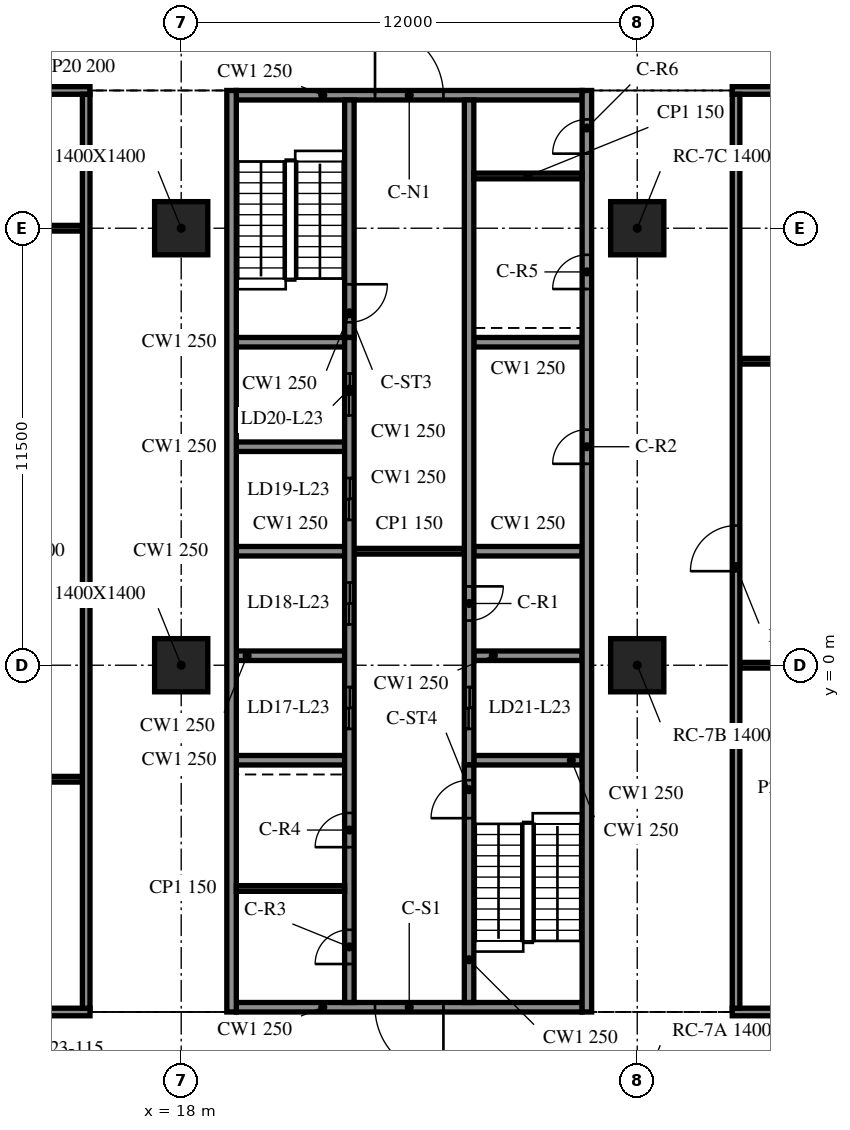
"""IFC4 building model, lengths in metres.
Left out: names, types, materials, properties, quantities, classifications, styles, units other than length and angle.
Written with IfcOpenShell. Run it as: python <this file> out.ifc"""

import sys

from ifc_helpers import new_model, si_unit, direction, frame, frame_2d, origin, origin_2d, place, context, subcontext, project, spatial, rectangle, extrude, element, fill, save


model = new_model("IFC4")
c1 = context("Model", 3, precision=1e-05, world=origin(), true_north=direction((0.0, 1.0)))
c2 = subcontext(c1, "Body", "Model", "MODEL_VIEW")
j1 = project(units=[si_unit("LENGTHUNIT", "METRE"), si_unit("PLANEANGLEUNIT", "RADIAN")], contexts=[c1])
p1 = place(None, origin())
s1 = spatial("IfcSite", under=j1, at=p1, CompositionType="ELEMENT")
p2 = place(p1, origin())
s2 = spatial("IfcBuilding", under=s1, at=p2, CompositionType="ELEMENT")
p3 = place(p2, frame((0.0, 0.0, 101.2)))
s3 = spatial("IfcBuildingStorey", under=s2, at=p3, CompositionType="ELEMENT", Elevation=101.2)
for number, where, z_axis, x_axis in (
    (1, (18.0, 0.0, -0.34), (0.0, 0.0, 1.0), (1.0, 0.0, 0.0)),
    (2, (18.0, 11.5, -0.34), (0.0, 0.0, 1.0), (1.0, 0.0, 0.0)),
    (3, (30.0, 0.0, -0.34), (0.0, 0.0, 1.0), (1.0, 0.0, 0.0)),
    (4, (30.0, 11.5, -0.34), (0.0, 0.0, 1.0), (1.0, 0.0, 0.0)),
):
    element("IfcColumn", number, at=place(p3, frame(where, z_axis=z_axis, x_axis=x_axis)), inside=s3, PredefinedType="COLUMN", context=c2, shape_type="SweptSolid", body=[
        extrude(rectangle(XDim=1.4, YDim=1.4, at=origin_2d()), origin(), (0.0, 0.0, 1.0), 4.1),
    ])
p4 = place(p3, frame((19.325, 15.125, 0.0), z_axis=(0.0, 0.0, 1.0), x_axis=(0.0, -1.0, 0.0)))
e5 = element("IfcWall", 5, at=p4, inside=s3, PredefinedType="SOLIDWALL", context=c2, shape_type="SweptSolid", body=[
    extrude(rectangle(XDim=24.25, YDim=0.25, at=frame_2d((12.125, 0.0))), origin(), (0.0, 0.0, 1.0), 3.76),
])
p5 = place(p3, frame((28.675, -9.125, 0.0), z_axis=(0.0, 0.0, 1.0), x_axis=(0.0, 1.0, 0.0)))
e6 = element("IfcWall", 6, at=p5, inside=s3, PredefinedType="SOLIDWALL", context=c2, shape_type="SweptSolid", body=[
    extrude(rectangle(XDim=24.25, YDim=0.25, at=frame_2d((12.125, 0.0))), origin(), (0.0, 0.0, 1.0), 3.76),
])
p6 = place(p5, frame((14.425, 0.0, 0.0)))
e7 = element("IfcOpeningElement", 7, at=p6, cuts=e6, PredefinedType="OPENING", context=c2, shape_type="SweptSolid", body=[
    extrude(rectangle(XDim=0.9, YDim=2.1, at=frame_2d((0.45, 1.05))), frame((0.0, 0.135, 0.0), z_axis=(0.0, -1.0, 0.0), x_axis=(1.0, 0.0, 0.0)), (0.0, 0.0, 1.0), 0.27),
])
p7 = place(p5, frame((19.025, 0.0, 0.0)))
e8 = element("IfcOpeningElement", 8, at=p7, cuts=e6, PredefinedType="OPENING", context=c2, shape_type="SweptSolid", body=[
    extrude(rectangle(XDim=0.9, YDim=2.1, at=frame_2d((0.45, 1.05))), frame((0.0, 0.135, 0.0), z_axis=(0.0, -1.0, 0.0), x_axis=(1.0, 0.0, 0.0)), (0.0, 0.0, 1.0), 0.27),
])
p8 = place(p5, frame((22.587, 0.0, 0.0)))
e9 = element("IfcOpeningElement", 9, at=p8, cuts=e6, PredefinedType="OPENING", context=c2, shape_type="SweptSolid", body=[
    extrude(rectangle(XDim=0.9, YDim=2.1, at=frame_2d((0.45, 1.05))), frame((0.0, 0.135, 0.0), z_axis=(0.0, -1.0, 0.0), x_axis=(1.0, 0.0, 0.0)), (0.0, 0.0, 1.0), 0.27),
])
p9 = place(p3, frame((28.55, -9.0, 0.0), z_axis=(0.0, 0.0, 1.0), x_axis=(-1.0, 0.0, 0.0)))
e10 = element("IfcWall", 10, at=p9, inside=s3, PredefinedType="SOLIDWALL", context=c2, shape_type="SweptSolid", body=[
    extrude(rectangle(XDim=9.1, YDim=0.25, at=frame_2d((4.55, 0.0))), origin(), (0.0, 0.0, 1.0), 3.76),
])
p10 = place(p9, frame((3.65, 0.0, 0.0)))
e11 = element("IfcOpeningElement", 11, at=p10, cuts=e10, PredefinedType="OPENING", context=c2, shape_type="SweptSolid", body=[
    extrude(rectangle(XDim=1.8, YDim=2.1, at=frame_2d((0.9, 1.05))), frame((0.0, 0.135, 0.0), z_axis=(0.0, -1.0, 0.0), x_axis=(1.0, 0.0, 0.0)), (0.0, 0.0, 1.0), 0.27),
])
p11 = place(p3, frame((19.45, 15.0, 0.0), z_axis=(0.0, 0.0, 1.0), x_axis=(1.0, 0.0, 0.0)))
e12 = element("IfcWall", 12, at=p11, inside=s3, PredefinedType="SOLIDWALL", context=c2, shape_type="SweptSolid", body=[
    extrude(rectangle(XDim=9.1, YDim=0.25, at=frame_2d((4.55, 0.0))), origin(), (0.0, 0.0, 1.0), 3.76),
])
p12 = place(p11, frame((3.65, 0.0, 0.0)))
e13 = element("IfcOpeningElement", 13, at=p12, cuts=e12, PredefinedType="OPENING", context=c2, shape_type="SweptSolid", body=[
    extrude(rectangle(XDim=1.8, YDim=2.1, at=frame_2d((0.9, 1.05))), frame((0.0, 0.135, 0.0), z_axis=(0.0, -1.0, 0.0), x_axis=(1.0, 0.0, 0.0)), (0.0, 0.0, 1.0), 0.27),
])
p13 = place(p3, frame((22.425, -8.875, 0.0), z_axis=(0.0, 0.0, 1.0), x_axis=(0.0, 1.0, 0.0)))
e14 = element("IfcWall", 14, at=p13, inside=s3, PredefinedType="SOLIDWALL", context=c2, shape_type="SweptSolid", body=[
    extrude(rectangle(XDim=17.5, YDim=0.25, at=frame_2d((8.75, 0.0))), origin(), (0.0, 0.0, 1.0), 3.76),
])
p14 = place(p13, frame((7.2, 0.0, 0.0)))
e15 = element("IfcOpeningElement", 15, at=p14, cuts=e14, PredefinedType="OPENING", context=c2, shape_type="SweptSolid", body=[
    extrude(rectangle(XDim=1.1, YDim=2.1, at=frame_2d((0.55, 1.05))), frame((0.0, 0.135, 0.0), z_axis=(0.0, -1.0, 0.0), x_axis=(1.0, 0.0, 0.0)), (0.0, 0.0, 1.0), 0.27),
])
p15 = place(p13, frame((9.95, 0.0, 0.0)))
e16 = element("IfcOpeningElement", 16, at=p15, cuts=e14, PredefinedType="OPENING", context=c2, shape_type="SweptSolid", body=[
    extrude(rectangle(XDim=1.1, YDim=2.1, at=frame_2d((0.55, 1.05))), frame((0.0, 0.135, 0.0), z_axis=(0.0, -1.0, 0.0), x_axis=(1.0, 0.0, 0.0)), (0.0, 0.0, 1.0), 0.27),
])
p16 = place(p13, frame((12.7, 0.0, 0.0)))
e17 = element("IfcOpeningElement", 17, at=p16, cuts=e14, PredefinedType="OPENING", context=c2, shape_type="SweptSolid", body=[
    extrude(rectangle(XDim=1.1, YDim=2.1, at=frame_2d((0.55, 1.05))), frame((0.0, 0.135, 0.0), z_axis=(0.0, -1.0, 0.0), x_axis=(1.0, 0.0, 0.0)), (0.0, 0.0, 1.0), 0.27),
])
p17 = place(p13, frame((15.45, 0.0, 0.0)))
e18 = element("IfcOpeningElement", 18, at=p17, cuts=e14, PredefinedType="OPENING", context=c2, shape_type="SweptSolid", body=[
    extrude(rectangle(XDim=1.1, YDim=2.1, at=frame_2d((0.55, 1.05))), frame((0.0, 0.135, 0.0), z_axis=(0.0, -1.0, 0.0), x_axis=(1.0, 0.0, 0.0)), (0.0, 0.0, 1.0), 0.27),
])
p18 = place(p13, frame((1.012, 0.0, 0.0)))
e19 = element("IfcOpeningElement", 19, at=p18, cuts=e14, PredefinedType="OPENING", context=c2, shape_type="SweptSolid", body=[
    extrude(rectangle(XDim=0.9, YDim=2.1, at=frame_2d((0.45, 1.05))), frame((0.0, 0.135, 0.0), z_axis=(0.0, -1.0, 0.0), x_axis=(1.0, 0.0, 0.0)), (0.0, 0.0, 1.0), 0.27),
])
p19 = place(p13, frame((4.087, 0.0, 0.0)))
e20 = element("IfcOpeningElement", 20, at=p19, cuts=e14, PredefinedType="OPENING", context=c2, shape_type="SweptSolid", body=[
    extrude(rectangle(XDim=0.9, YDim=2.1, at=frame_2d((0.45, 1.05))), frame((0.0, 0.135, 0.0), z_axis=(0.0, -1.0, 0.0), x_axis=(1.0, 0.0, 0.0)), (0.0, 0.0, 1.0), 0.27),
])
p20 = place(p3, frame((22.425, 14.875, 0.0), z_axis=(0.0, 0.0, 1.0), x_axis=(0.0, -1.0, 0.0)))
e21 = element("IfcWall", 21, at=p20, inside=s3, PredefinedType="SOLIDWALL", context=c2, shape_type="SweptSolid", body=[
    extrude(rectangle(XDim=6.25, YDim=0.25, at=frame_2d((3.125, 0.0))), origin(), (0.0, 0.0, 1.0), 3.76),
])
p21 = place(p20, frame((4.85, 0.0, 0.0)))
e22 = element("IfcOpeningElement", 22, at=p21, cuts=e21, PredefinedType="OPENING", context=c2, shape_type="SweptSolid", body=[
    extrude(rectangle(XDim=1.0, YDim=2.1, at=frame_2d((0.5, 1.05))), frame((0.0, 0.135, 0.0), z_axis=(0.0, -1.0, 0.0), x_axis=(1.0, 0.0, 0.0)), (0.0, 0.0, 1.0), 0.27),
])
p22 = place(p3, frame((25.575, -8.875, 0.0), z_axis=(0.0, 0.0, 1.0), x_axis=(0.0, 1.0, 0.0)))
e23 = element("IfcWall", 23, at=p22, inside=s3, PredefinedType="SOLIDWALL", context=c2, shape_type="SweptSolid", body=[
    extrude(rectangle(XDim=6.25, YDim=0.25, at=frame_2d((3.125, 0.0))), origin(), (0.0, 0.0, 1.0), 3.76),
])
p23 = place(p22, frame((4.85, 0.0, 0.0)))
e24 = element("IfcOpeningElement", 24, at=p23, cuts=e23, PredefinedType="OPENING", context=c2, shape_type="SweptSolid", body=[
    extrude(rectangle(XDim=1.0, YDim=2.1, at=frame_2d((0.5, 1.05))), frame((0.0, 0.135, 0.0), z_axis=(0.0, -1.0, 0.0), x_axis=(1.0, 0.0, 0.0)), (0.0, 0.0, 1.0), 0.27),
])
p24 = place(p3, frame((25.575, 14.875, 0.0), z_axis=(0.0, 0.0, 1.0), x_axis=(0.0, -1.0, 0.0)))
e25 = element("IfcWall", 25, at=p24, inside=s3, PredefinedType="SOLIDWALL", context=c2, shape_type="SweptSolid", body=[
    extrude(rectangle(XDim=17.5, YDim=0.25, at=frame_2d((8.75, 0.0))), origin(), (0.0, 0.0, 1.0), 3.76),
])
p25 = place(p24, frame((15.45, 0.0, 0.0)))
e26 = element("IfcOpeningElement", 26, at=p25, cuts=e25, PredefinedType="OPENING", context=c2, shape_type="SweptSolid", body=[
    extrude(rectangle(XDim=1.1, YDim=2.1, at=frame_2d((0.55, 1.05))), frame((0.0, 0.135, 0.0), z_axis=(0.0, -1.0, 0.0), x_axis=(1.0, 0.0, 0.0)), (0.0, 0.0, 1.0), 0.27),
])
p26 = place(p24, frame((12.8, 0.0, 0.0)))
e27 = element("IfcOpeningElement", 27, at=p26, cuts=e25, PredefinedType="OPENING", context=c2, shape_type="SweptSolid", body=[
    extrude(rectangle(XDim=0.9, YDim=2.1, at=frame_2d((0.45, 1.05))), frame((0.0, 0.135, 0.0), z_axis=(0.0, -1.0, 0.0), x_axis=(1.0, 0.0, 0.0)), (0.0, 0.0, 1.0), 0.27),
])
for number, where, z_axis, x_axis in (
    (28, (19.45, -2.5, 0.0), (0.0, 0.0, 1.0), (1.0, 0.0, 0.0)),
    (29, (19.45, 0.25, 0.0), (0.0, 0.0, 1.0), (1.0, 0.0, 0.0)),
    (30, (19.45, 3.0, 0.0), (0.0, 0.0, 1.0), (1.0, 0.0, 0.0)),
    (31, (19.45, 5.75, 0.0), (0.0, 0.0, 1.0), (1.0, 0.0, 0.0)),
    (32, (19.45, 8.5, 0.0), (0.0, 0.0, 1.0), (1.0, 0.0, 0.0)),
    (33, (25.7, -2.5, 0.0), (0.0, 0.0, 1.0), (1.0, 0.0, 0.0)),
    (34, (25.7, 0.25, 0.0), (0.0, 0.0, 1.0), (1.0, 0.0, 0.0)),
    (35, (25.7, 3.0, 0.0), (0.0, 0.0, 1.0), (1.0, 0.0, 0.0)),
    (36, (25.7, 8.5, 0.0), (0.0, 0.0, 1.0), (1.0, 0.0, 0.0)),
):
    element("IfcWall", number, at=place(p3, frame(where, z_axis=z_axis, x_axis=x_axis)), inside=s3, PredefinedType="SOLIDWALL", context=c2, shape_type="SweptSolid", body=[
        extrude(rectangle(XDim=2.85, YDim=0.25, at=frame_2d((1.425, 0.0))), origin(), (0.0, 0.0, 1.0), 3.76),
    ])
p27 = place(p3, frame((22.55, 3.0, 0.0), z_axis=(0.0, 0.0, 1.0), x_axis=(1.0, 0.0, 0.0)))
e37 = element("IfcWall", 37, at=p27, inside=s3, PredefinedType="PARTITIONING", context=c2, shape_type="SweptSolid", body=[
    extrude(rectangle(XDim=2.9, YDim=0.15, at=frame_2d((1.45, 0.0))), origin(), (0.0, 0.0, 1.0), 3.76),
])
for number, where, z_axis, x_axis in (
    (38, (19.45, -5.875, 0.0), (0.0, 0.0, 1.0), (1.0, 0.0, 0.0)),
    (39, (25.7, 12.875, 0.0), (0.0, 0.0, 1.0), (1.0, 0.0, 0.0)),
):
    element("IfcWall", number, at=place(p3, frame(where, z_axis=z_axis, x_axis=x_axis)), inside=s3, PredefinedType="PARTITIONING", context=c2, shape_type="SweptSolid", body=[
        extrude(rectangle(XDim=2.85, YDim=0.15, at=frame_2d((1.425, 0.0))), origin(), (0.0, 0.0, 1.0), 3.76),
    ])
p28 = place(p3, frame((8.3, -9.125, 0.0), z_axis=(0.0, 0.0, 1.0), x_axis=(1.0, 0.0, 0.0)))
e40 = element("IfcWall", 40, at=p28, inside=s3, PredefinedType="PARTITIONING", context=c2, shape_type="SweptSolid", body=[
    extrude(rectangle(XDim=7.3, YDim=0.2, at=frame_2d((3.65, 0.0))), origin(), (0.0, 0.0, 1.0), 3.76),
])
p29 = place(p28, frame((3.1, 0.0, 0.0)))
e41 = element("IfcOpeningElement", 41, at=p29, cuts=e40, PredefinedType="OPENING", context=c2, shape_type="SweptSolid", body=[
    extrude(rectangle(XDim=1.2, YDim=2.1, at=frame_2d((0.6, 1.05))), frame((0.0, 0.11, 0.0), z_axis=(0.0, -1.0, 0.0), x_axis=(1.0, 0.0, 0.0)), (0.0, 0.0, 1.0), 0.22),
])
p30 = place(p3, frame((32.5, -9.125, 0.0), z_axis=(0.0, 0.0, 1.0), x_axis=(1.0, 0.0, 0.0)))
e42 = element("IfcWall", 42, at=p30, inside=s3, PredefinedType="PARTITIONING", context=c2, shape_type="SweptSolid", body=[
    extrude(rectangle(XDim=21.475, YDim=0.2, at=frame_2d((10.738, 0.0))), origin(), (0.0, 0.0, 1.0), 3.76),
])
p31 = place(p30, frame((10.1, 0.0, 0.0)))
e43 = element("IfcOpeningElement", 43, at=p31, cuts=e42, PredefinedType="OPENING", context=c2, shape_type="SweptSolid", body=[
    extrude(rectangle(XDim=1.2, YDim=2.1, at=frame_2d((0.6, 1.05))), frame((0.0, 0.11, 0.0), z_axis=(0.0, -1.0, 0.0), x_axis=(1.0, 0.0, 0.0)), (0.0, 0.0, 1.0), 0.22),
])
p32 = place(p3, frame((8.5, -3.0, 0.0), z_axis=(0.0, 0.0, 1.0), x_axis=(1.0, 0.0, 0.0)))
e44 = element("IfcWall", 44, at=p32, inside=s3, PredefinedType="PARTITIONING", context=c2, shape_type="SweptSolid", body=[
    extrude(rectangle(XDim=6.9, YDim=0.15, at=frame_2d((3.45, 0.0))), origin(), (0.0, 0.0, 1.0), 3.76),
])
p33 = place(p3, frame((32.7, 0.0, 0.0), z_axis=(0.0, 0.0, 1.0), x_axis=(1.0, 0.0, 0.0)))
e45 = element("IfcWall", 45, at=p33, inside=s3, PredefinedType="PARTITIONING", context=c2, shape_type="SweptSolid", body=[
    extrude(rectangle(XDim=8.6, YDim=0.15, at=frame_2d((4.3, 0.0))), origin(), (0.0, 0.0, 1.0), 3.76),
])
p34 = place(p3, frame((32.7, 8.0, 0.0), z_axis=(0.0, 0.0, 1.0), x_axis=(1.0, 0.0, 0.0)))
e46 = element("IfcWall", 46, at=p34, inside=s3, PredefinedType="PARTITIONING", context=c2, shape_type="SweptSolid", body=[
    extrude(rectangle(XDim=21.275, YDim=0.15, at=frame_2d((10.638, 0.0))), origin(), (0.0, 0.0, 1.0), 3.76),
])
p35 = place(p3, frame((8.5, 11.5, 0.0), z_axis=(0.0, 0.0, 1.0), x_axis=(1.0, 0.0, 0.0)))
e47 = element("IfcWall", 47, at=p35, inside=s3, PredefinedType="PARTITIONING", context=c2, shape_type="SweptSolid", body=[
    extrude(rectangle(XDim=6.9, YDim=0.15, at=frame_2d((3.45, 0.0))), origin(), (0.0, 0.0, 1.0), 3.76),
])
p36 = place(p3, frame((8.3, 15.125, 0.0), z_axis=(0.0, 0.0, 1.0), x_axis=(1.0, 0.0, 0.0)))
e48 = element("IfcWall", 48, at=p36, inside=s3, PredefinedType="PARTITIONING", context=c2, shape_type="SweptSolid", body=[
    extrude(rectangle(XDim=7.3, YDim=0.2, at=frame_2d((3.65, 0.0))), origin(), (0.0, 0.0, 1.0), 3.76),
])
p37 = place(p36, frame((3.1, 0.0, 0.0)))
e49 = element("IfcOpeningElement", 49, at=p37, cuts=e48, PredefinedType="OPENING", context=c2, shape_type="SweptSolid", body=[
    extrude(rectangle(XDim=1.0, YDim=2.1, at=frame_2d((0.5, 1.05))), frame((0.0, 0.11, 0.0), z_axis=(0.0, -1.0, 0.0), x_axis=(1.0, 0.0, 0.0)), (0.0, 0.0, 1.0), 0.22),
])
p38 = place(p3, frame((32.5, 15.125, 0.0), z_axis=(0.0, 0.0, 1.0), x_axis=(1.0, 0.0, 0.0)))
e50 = element("IfcWall", 50, at=p38, inside=s3, PredefinedType="PARTITIONING", context=c2, shape_type="SweptSolid", body=[
    extrude(rectangle(XDim=21.475, YDim=0.2, at=frame_2d((10.738, 0.0))), origin(), (0.0, 0.0, 1.0), 3.76),
])
p39 = place(p38, frame((10.1, 0.0, 0.0)))
e51 = element("IfcOpeningElement", 51, at=p39, cuts=e50, PredefinedType="OPENING", context=c2, shape_type="SweptSolid", body=[
    extrude(rectangle(XDim=1.2, YDim=2.1, at=frame_2d((0.6, 1.05))), frame((0.0, 0.11, 0.0), z_axis=(0.0, -1.0, 0.0), x_axis=(1.0, 0.0, 0.0)), (0.0, 0.0, 1.0), 0.22),
])
p40 = place(p3, frame((15.5, -9.025, 0.0), z_axis=(0.0, 0.0, 1.0), x_axis=(0.0, 1.0, 0.0)))
e52 = element("IfcWall", 52, at=p40, inside=s3, PredefinedType="PARTITIONING", context=c2, shape_type="SweptSolid", body=[
    extrude(rectangle(XDim=24.05, YDim=0.2, at=frame_2d((12.025, 0.0))), origin(), (0.0, 0.0, 1.0), 3.76),
])
p41 = place(p3, frame((32.6, -9.025, 0.0), z_axis=(0.0, 0.0, 1.0), x_axis=(0.0, 1.0, 0.0)))
e53 = element("IfcWall", 53, at=p41, inside=s3, PredefinedType="PARTITIONING", context=c2, shape_type="SweptSolid", body=[
    extrude(rectangle(XDim=24.05, YDim=0.2, at=frame_2d((12.025, 0.0))), origin(), (0.0, 0.0, 1.0), 3.76),
])
p42 = place(p41, frame((11.5, 0.0, 0.0)))
e54 = element("IfcOpeningElement", 54, at=p42, cuts=e53, PredefinedType="OPENING", context=c2, shape_type="SweptSolid", body=[
    extrude(rectangle(XDim=1.2, YDim=2.1, at=frame_2d((0.6, 1.05))), frame((0.0, 0.11, 0.0), z_axis=(0.0, -1.0, 0.0), x_axis=(1.0, 0.0, 0.0)), (0.0, 0.0, 1.0), 0.22),
])
p43 = place(p10, origin())
e55 = element("IfcDoor", 55, at=p43, inside=s3, OperationType="DOUBLE_DOOR_SINGLE_SWING", PredefinedType="DOOR", context=c2, shape_type="SweptSolid", body=[
    extrude(rectangle(XDim=1.8, YDim=2.1, at=frame_2d((0.9, 1.05))), frame((0.0, 0.025, 0.0), z_axis=(0.0, -1.0, 0.0), x_axis=(1.0, 0.0, 0.0)), (0.0, 0.0, 1.0), 0.05),
])
fill(e11, e55)
p44 = place(p12, origin())
e56 = element("IfcDoor", 56, at=p44, inside=s3, OperationType="DOUBLE_DOOR_SINGLE_SWING", PredefinedType="DOOR", context=c2, shape_type="SweptSolid", body=[
    extrude(rectangle(XDim=1.8, YDim=2.1, at=frame_2d((0.9, 1.05))), frame((0.0, 0.025, 0.0), z_axis=(0.0, -1.0, 0.0), x_axis=(1.0, 0.0, 0.0)), (0.0, 0.0, 1.0), 0.05),
])
fill(e13, e56)
p45 = place(p25, origin())
e57 = element("IfcDoor", 57, at=p45, inside=s3, OperationType="DOUBLE_DOOR_SLIDING", PredefinedType="DOOR", context=c2, shape_type="SweptSolid", body=[
    extrude(rectangle(XDim=1.1, YDim=2.1, at=frame_2d((0.55, 1.05))), frame((0.0, 0.025, 0.0), z_axis=(0.0, -1.0, 0.0), x_axis=(1.0, 0.0, 0.0)), (0.0, 0.0, 1.0), 0.05),
])
fill(e26, e57)
p46 = place(p14, origin())
e58 = element("IfcDoor", 58, at=p46, inside=s3, OperationType="DOUBLE_DOOR_SLIDING", PredefinedType="DOOR", context=c2, shape_type="SweptSolid", body=[
    extrude(rectangle(XDim=1.1, YDim=2.1, at=frame_2d((0.55, 1.05))), frame((0.0, 0.025, 0.0), z_axis=(0.0, -1.0, 0.0), x_axis=(1.0, 0.0, 0.0)), (0.0, 0.0, 1.0), 0.05),
])
fill(e15, e58)
p47 = place(p15, origin())
e59 = element("IfcDoor", 59, at=p47, inside=s3, OperationType="DOUBLE_DOOR_SLIDING", PredefinedType="DOOR", context=c2, shape_type="SweptSolid", body=[
    extrude(rectangle(XDim=1.1, YDim=2.1, at=frame_2d((0.55, 1.05))), frame((0.0, 0.025, 0.0), z_axis=(0.0, -1.0, 0.0), x_axis=(1.0, 0.0, 0.0)), (0.0, 0.0, 1.0), 0.05),
])
fill(e16, e59)
p48 = place(p16, origin())
e60 = element("IfcDoor", 60, at=p48, inside=s3, OperationType="DOUBLE_DOOR_SLIDING", PredefinedType="DOOR", context=c2, shape_type="SweptSolid", body=[
    extrude(rectangle(XDim=1.1, YDim=2.1, at=frame_2d((0.55, 1.05))), frame((0.0, 0.025, 0.0), z_axis=(0.0, -1.0, 0.0), x_axis=(1.0, 0.0, 0.0)), (0.0, 0.0, 1.0), 0.05),
])
fill(e17, e60)
p49 = place(p17, origin())
e61 = element("IfcDoor", 61, at=p49, inside=s3, OperationType="DOUBLE_DOOR_SLIDING", PredefinedType="DOOR", context=c2, shape_type="SweptSolid", body=[
    extrude(rectangle(XDim=1.1, YDim=2.1, at=frame_2d((0.55, 1.05))), frame((0.0, 0.025, 0.0), z_axis=(0.0, -1.0, 0.0), x_axis=(1.0, 0.0, 0.0)), (0.0, 0.0, 1.0), 0.05),
])
fill(e18, e61)
p50 = place(p26, origin())
e62 = element("IfcDoor", 62, at=p50, inside=s3, OperationType="SINGLE_SWING_LEFT", PredefinedType="DOOR", context=c2, shape_type="SweptSolid", body=[
    extrude(rectangle(XDim=0.9, YDim=2.1, at=frame_2d((0.45, 1.05))), frame((0.0, 0.025, 0.0), z_axis=(0.0, -1.0, 0.0), x_axis=(1.0, 0.0, 0.0)), (0.0, 0.0, 1.0), 0.05),
])
fill(e27, e62)
p51 = place(p6, origin())
e63 = element("IfcDoor", 63, at=p51, inside=s3, OperationType="SINGLE_SWING_RIGHT", PredefinedType="DOOR", context=c2, shape_type="SweptSolid", body=[
    extrude(rectangle(XDim=0.9, YDim=2.1, at=frame_2d((0.45, 1.05))), frame((0.0, 0.025, 0.0), z_axis=(0.0, -1.0, 0.0), x_axis=(1.0, 0.0, 0.0)), (0.0, 0.0, 1.0), 0.05),
])
fill(e7, e63)
p52 = place(p18, origin())
e64 = element("IfcDoor", 64, at=p52, inside=s3, OperationType="SINGLE_SWING_LEFT", PredefinedType="DOOR", context=c2, shape_type="SweptSolid", body=[
    extrude(rectangle(XDim=0.9, YDim=2.1, at=frame_2d((0.45, 1.05))), frame((0.0, 0.025, 0.0), z_axis=(0.0, -1.0, 0.0), x_axis=(1.0, 0.0, 0.0)), (0.0, 0.0, 1.0), 0.05),
])
fill(e19, e64)
p53 = place(p19, origin())
e65 = element("IfcDoor", 65, at=p53, inside=s3, OperationType="SINGLE_SWING_RIGHT", PredefinedType="DOOR", context=c2, shape_type="SweptSolid", body=[
    extrude(rectangle(XDim=0.9, YDim=2.1, at=frame_2d((0.45, 1.05))), frame((0.0, 0.025, 0.0), z_axis=(0.0, -1.0, 0.0), x_axis=(1.0, 0.0, 0.0)), (0.0, 0.0, 1.0), 0.05),
])
fill(e20, e65)
p54 = place(p7, origin())
e66 = element("IfcDoor", 66, at=p54, inside=s3, OperationType="SINGLE_SWING_LEFT", PredefinedType="DOOR", context=c2, shape_type="SweptSolid", body=[
    extrude(rectangle(XDim=0.9, YDim=2.1, at=frame_2d((0.45, 1.05))), frame((0.0, 0.025, 0.0), z_axis=(0.0, -1.0, 0.0), x_axis=(1.0, 0.0, 0.0)), (0.0, 0.0, 1.0), 0.05),
])
fill(e8, e66)
p55 = place(p8, origin())
e67 = element("IfcDoor", 67, at=p55, inside=s3, OperationType="SINGLE_SWING_RIGHT", PredefinedType="DOOR", context=c2, shape_type="SweptSolid", body=[
    extrude(rectangle(XDim=0.9, YDim=2.1, at=frame_2d((0.45, 1.05))), frame((0.0, 0.025, 0.0), z_axis=(0.0, -1.0, 0.0), x_axis=(1.0, 0.0, 0.0)), (0.0, 0.0, 1.0), 0.05),
])
fill(e9, e67)
p56 = place(p21, origin())
e68 = element("IfcDoor", 68, at=p56, inside=s3, OperationType="SINGLE_SWING_LEFT", PredefinedType="DOOR", context=c2, shape_type="SweptSolid", body=[
    extrude(rectangle(XDim=1.0, YDim=2.1, at=frame_2d((0.5, 1.05))), frame((0.0, 0.025, 0.0), z_axis=(0.0, -1.0, 0.0), x_axis=(1.0, 0.0, 0.0)), (0.0, 0.0, 1.0), 0.05),
])
fill(e22, e68)
p57 = place(p23, origin())
e69 = element("IfcDoor", 69, at=p57, inside=s3, OperationType="SINGLE_SWING_RIGHT", PredefinedType="DOOR", context=c2, shape_type="SweptSolid", body=[
    extrude(rectangle(XDim=1.0, YDim=2.1, at=frame_2d((0.5, 1.05))), frame((0.0, 0.025, 0.0), z_axis=(0.0, -1.0, 0.0), x_axis=(1.0, 0.0, 0.0)), (0.0, 0.0, 1.0), 0.05),
])
fill(e24, e69)
p58 = place(p42, origin())
e70 = element("IfcDoor", 70, at=p58, inside=s3, OperationType="SINGLE_SWING_LEFT", PredefinedType="DOOR", context=c2, shape_type="SweptSolid", body=[
    extrude(rectangle(XDim=1.2, YDim=2.1, at=frame_2d((0.6, 1.05))), frame((0.0, 0.025, 0.0), z_axis=(0.0, -1.0, 0.0), x_axis=(1.0, 0.0, 0.0)), (0.0, 0.0, 1.0), 0.05),
])
fill(e54, e70)
save(model, sys.argv[1])
